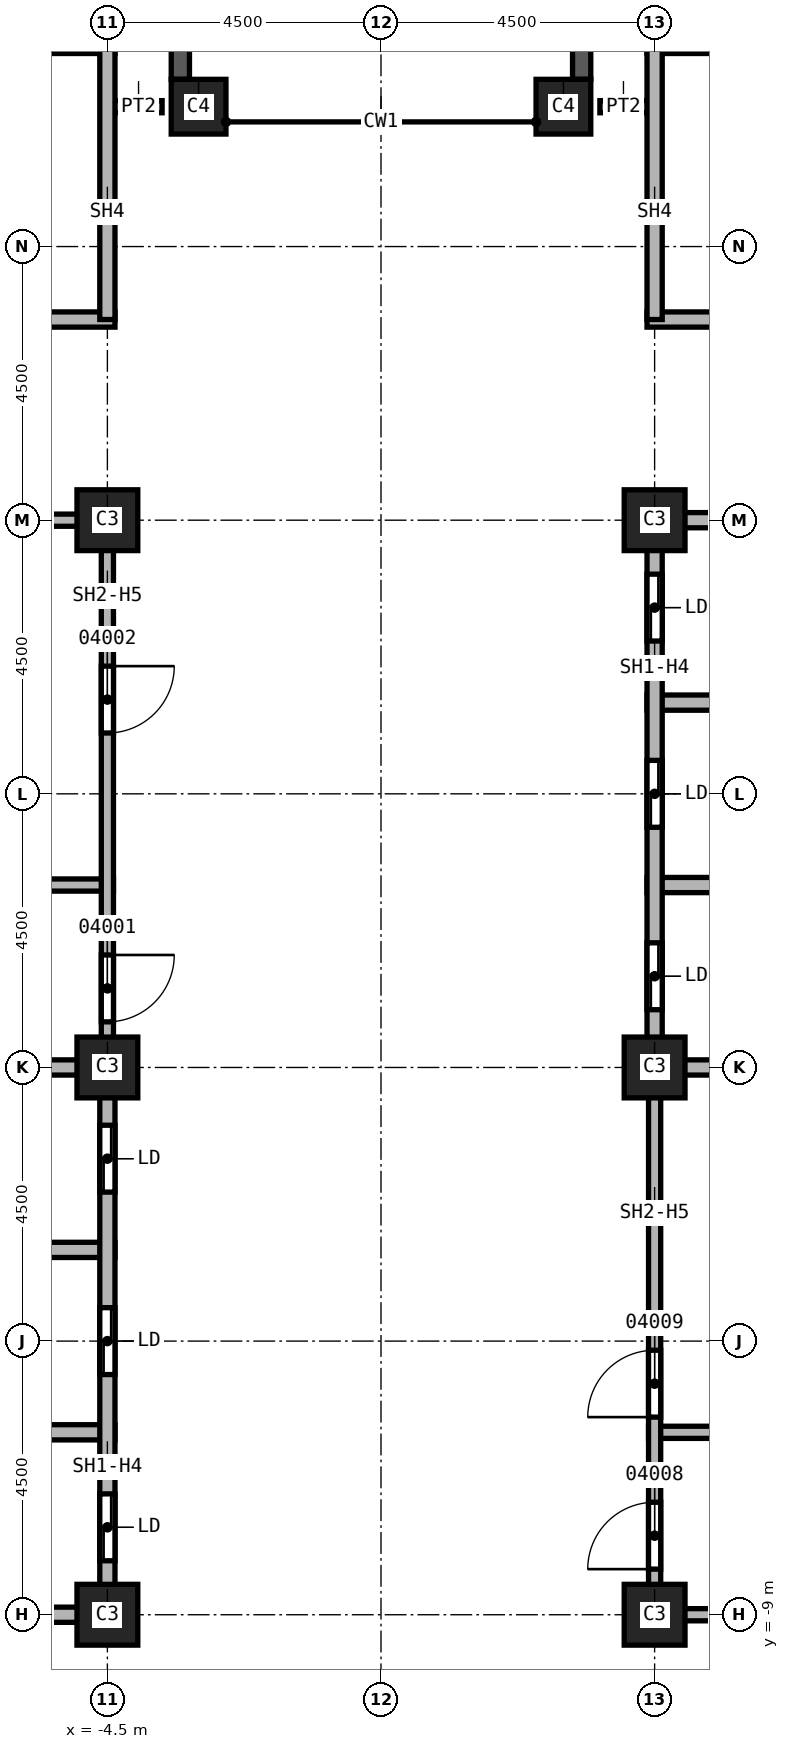
"""IFC4 building model, lengths in metres.
Left out: names, types, materials, properties, quantities, classifications, styles, units other than length and angle.
Written with IfcOpenShell. Run it as: python <this file> out.ifc"""

import sys

from ifc_helpers import new_model, si_unit, direction, frame, frame_2d, origin, origin_2d, place, context, subcontext, project, spatial, rectangle, extrude, element, fill, save


model = new_model("IFC4")
c1 = context("Model", 3, precision=1e-05, world=origin(), true_north=direction((0.0, 1.0)))
c2 = subcontext(c1, "Body", "Model", "MODEL_VIEW")
j1 = project(units=[si_unit("LENGTHUNIT", "METRE"), si_unit("PLANEANGLEUNIT", "RADIAN")], contexts=[c1])
p1 = place(None, origin())
s1 = spatial("IfcSite", under=j1, at=p1, CompositionType="ELEMENT")
p2 = place(p1, origin())
s2 = spatial("IfcBuilding", under=s1, at=p2, CompositionType="ELEMENT")
p3 = place(p2, frame((0.0, 0.0, 108.0)))
s3 = spatial("IfcBuildingStorey", under=s2, at=p3, CompositionType="ELEMENT", Elevation=108.0)
for number, where, z_axis, x_axis in (
    (1, (4.5, 0.0, 0.0), (0.0, 0.0, 1.0), (1.0, 0.0, 0.0)),
    (2, (4.5, 9.0, 0.0), (0.0, 0.0, 1.0), (1.0, 0.0, 0.0)),
    (3, (4.5, -9.0, 0.0), (0.0, 0.0, 1.0), (1.0, 0.0, 0.0)),
    (4, (-4.5, 0.0, 0.0), (0.0, 0.0, 1.0), (1.0, 0.0, 0.0)),
    (5, (-4.5, 9.0, 0.0), (0.0, 0.0, 1.0), (1.0, 0.0, 0.0)),
    (6, (-4.5, -9.0, 0.0), (0.0, 0.0, 1.0), (1.0, 0.0, 0.0)),
):
    element("IfcColumn", number, at=place(p3, frame(where, z_axis=z_axis, x_axis=x_axis)), inside=s3, PredefinedType="COLUMN", context=c2, shape_type="SweptSolid", body=[
        extrude(rectangle(XDim=1.0, YDim=1.0, at=origin_2d()), origin(), (0.0, 0.0, 1.0), 3.7),
    ])
for number, where, z_axis, x_axis in (
    (7, (3.0, 15.8, 0.0), (0.0, 0.0, 1.0), (1.0, 0.0, 0.0)),
    (8, (-3.0, 15.8, 0.0), (0.0, 0.0, 1.0), (1.0, 0.0, 0.0)),
):
    element("IfcColumn", number, at=place(p3, frame(where, z_axis=z_axis, x_axis=x_axis)), inside=s3, PredefinedType="COLUMN", context=c2, shape_type="SweptSolid", body=[
        extrude(rectangle(XDim=0.9, YDim=0.9, at=origin_2d()), origin(), (0.0, 0.0, 1.0), 3.7),
    ])
p4 = place(p3, frame((3.3, 24.2, 0.0), z_axis=(0.0, 0.0, 1.0), x_axis=(0.0, -1.0, 0.0)))
e9 = element("IfcWall", 9, at=p4, inside=s3, PredefinedType="SOLIDWALL", context=c2, shape_type="SweptSolid", body=[
    extrude(rectangle(XDim=7.95, YDim=0.3, at=frame_2d((3.975, 0.0))), origin(), (0.0, 0.0, 1.0), 3.1),
])
p5 = place(p4, frame((0.788, 0.0, 0.8)))
e10 = element("IfcOpeningElement", 10, at=p5, cuts=e9, PredefinedType="OPENING", context=c2, shape_type="SweptSolid", body=[
    extrude(rectangle(XDim=2.4, YDim=1.95, at=frame_2d((1.2, 0.975))), frame((0.0, 0.15, 0.0), z_axis=(0.0, -1.0, 0.0), x_axis=(1.0, 0.0, 0.0)), (0.0, 0.0, 1.0), 0.3),
])
p6 = place(p4, frame((4.762, 0.0, 0.8)))
e11 = element("IfcOpeningElement", 11, at=p6, cuts=e9, PredefinedType="OPENING", context=c2, shape_type="SweptSolid", body=[
    extrude(rectangle(XDim=2.4, YDim=1.95, at=frame_2d((1.2, 0.975))), frame((0.0, 0.15, 0.0), z_axis=(0.0, -1.0, 0.0), x_axis=(1.0, 0.0, 0.0)), (0.0, 0.0, 1.0), 0.3),
])
p7 = place(p3, frame((-3.3, 16.25, 0.0), z_axis=(0.0, 0.0, 1.0), x_axis=(0.0, 1.0, 0.0)))
e12 = element("IfcWall", 12, at=p7, inside=s3, PredefinedType="SOLIDWALL", context=c2, shape_type="SweptSolid", body=[
    extrude(rectangle(XDim=7.95, YDim=0.3, at=frame_2d((3.975, 0.0))), origin(), (0.0, 0.0, 1.0), 3.1),
])
p8 = place(p7, frame((0.788, 0.0, 0.8)))
e13 = element("IfcOpeningElement", 13, at=p8, cuts=e12, PredefinedType="OPENING", context=c2, shape_type="SweptSolid", body=[
    extrude(rectangle(XDim=2.4, YDim=1.95, at=frame_2d((1.2, 0.975))), frame((0.0, 0.15, 0.0), z_axis=(0.0, -1.0, 0.0), x_axis=(1.0, 0.0, 0.0)), (0.0, 0.0, 1.0), 0.3),
])
p9 = place(p7, frame((4.762, 0.0, 0.8)))
e14 = element("IfcOpeningElement", 14, at=p9, cuts=e12, PredefinedType="OPENING", context=c2, shape_type="SweptSolid", body=[
    extrude(rectangle(XDim=2.4, YDim=1.95, at=frame_2d((1.2, 0.975))), frame((0.0, 0.15, 0.0), z_axis=(0.0, -1.0, 0.0), x_axis=(1.0, 0.0, 0.0)), (0.0, 0.0, 1.0), 0.3),
])
for number, where, z_axis, x_axis in (
    (15, (-4.5, 15.8, 0.0), (0.0, 0.0, 1.0), (1.0, 0.0, 0.0)),
    (16, (3.6, 15.8, 0.0), (0.0, 0.0, 1.0), (1.0, 0.0, 0.0)),
):
    element("IfcWall", number, at=place(p3, frame(where, z_axis=z_axis, x_axis=x_axis)), inside=s3, PredefinedType="PARTITIONING", context=c2, shape_type="SweptSolid", body=[
        extrude(rectangle(XDim=0.9, YDim=0.2, at=frame_2d((0.45, 0.0))), origin(), (0.0, 0.0, 1.0), 3.7),
    ])
p10 = place(p3, frame((-7.625, 3.0, 0.0), z_axis=(0.0, 0.0, 1.0), x_axis=(1.0, 0.0, 0.0)))
e17 = element("IfcWall", 17, at=p10, inside=s3, PredefinedType="SOLIDWALL", context=c2, shape_type="SweptSolid", body=[
    extrude(rectangle(XDim=3.225, YDim=0.2, at=frame_2d((1.613, 0.0))), origin(), (0.0, 0.0, 1.0), 3.7),
])
p11 = place(p3, frame((-7.5, 9.0, 0.0), z_axis=(0.0, 0.0, 1.0), x_axis=(1.0, 0.0, 0.0)))
e18 = element("IfcWall", 18, at=p11, inside=s3, PredefinedType="SOLIDWALL", context=c2, shape_type="SweptSolid", body=[
    extrude(rectangle(XDim=3.0, YDim=0.2, at=frame_2d((1.5, 0.0))), origin(), (0.0, 0.0, 1.0), 2.938),
])
p12 = place(p3, frame((-4.5, 9.1, 0.0), z_axis=(0.0, 0.0, 1.0), x_axis=(0.0, -1.0, 0.0)))
e19 = element("IfcWall", 19, at=p12, inside=s3, PredefinedType="SOLIDWALL", context=c2, shape_type="SweptSolid", body=[
    extrude(rectangle(XDim=9.1, YDim=0.2, at=frame_2d((4.55, 0.0))), origin(), (0.0, 0.0, 1.0), 2.938),
])
p13 = place(p12, frame((7.25, 0.0, 0.0)))
e20 = element("IfcOpeningElement", 20, at=p13, cuts=e19, PredefinedType="OPENING", context=c2, shape_type="SweptSolid", body=[
    extrude(rectangle(XDim=1.1, YDim=2.1, at=frame_2d((0.55, 1.05))), frame((0.0, 0.1, 0.0), z_axis=(0.0, -1.0, 0.0), x_axis=(1.0, 0.0, 0.0)), (0.0, 0.0, 1.0), 0.2),
])
p14 = place(p12, frame((2.5, 0.0, 0.0)))
e21 = element("IfcOpeningElement", 21, at=p14, cuts=e19, PredefinedType="OPENING", context=c2, shape_type="SweptSolid", body=[
    extrude(rectangle(XDim=1.1, YDim=2.1, at=frame_2d((0.55, 1.05))), frame((0.0, 0.1, 0.0), z_axis=(0.0, -1.0, 0.0), x_axis=(1.0, 0.0, 0.0)), (0.0, 0.0, 1.0), 0.2),
])
p15 = place(p3, frame((4.4, -6.0, 0.0), z_axis=(0.0, 0.0, 1.0), x_axis=(1.0, 0.0, 0.0)))
e22 = element("IfcWall", 22, at=p15, inside=s3, PredefinedType="SOLIDWALL", context=c2, shape_type="SweptSolid", body=[
    extrude(rectangle(XDim=3.2, YDim=0.2, at=frame_2d((1.6, 0.0))), origin(), (0.0, 0.0, 1.0), 3.7),
])
p16 = place(p3, frame((4.5, -9.1, 0.0), z_axis=(0.0, 0.0, 1.0), x_axis=(0.0, 1.0, 0.0)))
e23 = element("IfcWall", 23, at=p16, inside=s3, PredefinedType="SOLIDWALL", context=c2, shape_type="SweptSolid", body=[
    extrude(rectangle(XDim=9.1, YDim=0.2, at=frame_2d((4.55, 0.0))), origin(), (0.0, 0.0, 1.0), 2.938),
])
p17 = place(p16, frame((0.85, 0.0, 0.0)))
e24 = element("IfcOpeningElement", 24, at=p17, cuts=e23, PredefinedType="OPENING", context=c2, shape_type="SweptSolid", body=[
    extrude(rectangle(XDim=1.1, YDim=2.1, at=frame_2d((0.55, 1.05))), frame((0.0, 0.1, 0.0), z_axis=(0.0, -1.0, 0.0), x_axis=(1.0, 0.0, 0.0)), (0.0, 0.0, 1.0), 0.2),
])
p18 = place(p16, frame((3.35, 0.0, 0.0)))
e25 = element("IfcOpeningElement", 25, at=p18, cuts=e23, PredefinedType="OPENING", context=c2, shape_type="SweptSolid", body=[
    extrude(rectangle(XDim=1.1, YDim=2.1, at=frame_2d((0.55, 1.05))), frame((0.0, 0.1, 0.0), z_axis=(0.0, -1.0, 0.0), x_axis=(1.0, 0.0, 0.0)), (0.0, 0.0, 1.0), 0.2),
])
p19 = place(p3, frame((7.5, -9.0, 0.0), z_axis=(0.0, 0.0, 1.0), x_axis=(-1.0, 0.0, 0.0)))
e26 = element("IfcWall", 26, at=p19, inside=s3, PredefinedType="SOLIDWALL", context=c2, shape_type="SweptSolid", body=[
    extrude(rectangle(XDim=3.0, YDim=0.2, at=frame_2d((1.5, 0.0))), origin(), (0.0, 0.0, 1.0), 2.938),
])
p20 = place(p3, frame((-13.625, -3.0, 0.0), z_axis=(0.0, 0.0, 1.0), x_axis=(1.0, 0.0, 0.0)))
e27 = element("IfcWall", 27, at=p20, inside=s3, PredefinedType="SOLIDWALL", context=c2, shape_type="SweptSolid", body=[
    extrude(rectangle(XDim=9.25, YDim=0.25, at=frame_2d((4.625, 0.0))), origin(), (0.0, 0.0, 1.0), 3.7),
])
p21 = place(p20, frame((3.25, 0.0, 0.0)))
e28 = element("IfcOpeningElement", 28, at=p21, cuts=e27, PredefinedType="OPENING", context=c2, shape_type="SweptSolid", body=[
    extrude(rectangle(XDim=1.1, YDim=2.1, at=frame_2d((0.55, 1.05))), frame((0.0, 0.125, 0.0), z_axis=(0.0, -1.0, 0.0), x_axis=(1.0, 0.0, 0.0)), (0.0, 0.0, 1.0), 0.25),
])
for number, where, z_axis, x_axis in (
    (29, (-7.625, -6.0, 0.0), (0.0, 0.0, 1.0), (1.0, 0.0, 0.0)),
    (30, (-7.625, 0.0, 0.0), (0.0, 0.0, 1.0), (1.0, 0.0, 0.0)),
):
    element("IfcWall", number, at=place(p3, frame(where, z_axis=z_axis, x_axis=x_axis)), inside=s3, PredefinedType="SOLIDWALL", context=c2, shape_type="SweptSolid", body=[
        extrude(rectangle(XDim=3.25, YDim=0.25, at=frame_2d((1.625, 0.0))), origin(), (0.0, 0.0, 1.0), 3.7),
    ])
p22 = place(p3, frame((-4.5, -9.0, 0.0), z_axis=(0.0, 0.0, 1.0), x_axis=(-1.0, 0.0, 0.0)))
e31 = element("IfcWall", 31, at=p22, inside=s3, PredefinedType="SOLIDWALL", context=c2, shape_type="SweptSolid", body=[
    extrude(rectangle(XDim=3.0, YDim=0.25, at=frame_2d((1.5, 0.0))), origin(), (0.0, 0.0, 1.0), 2.938),
])
p23 = place(p3, frame((-4.5, 0.0, 0.0), z_axis=(0.0, 0.0, 1.0), x_axis=(0.0, -1.0, 0.0)))
e32 = element("IfcWall", 32, at=p23, inside=s3, PredefinedType="SOLIDWALL", context=c2, shape_type="SweptSolid", body=[
    extrude(rectangle(XDim=9.125, YDim=0.25, at=frame_2d((4.562, 0.0))), origin(), (0.0, 0.0, 1.0), 2.938),
])
p24 = place(p23, frame((7.012, 0.0, 0.0)))
e33 = element("IfcOpeningElement", 33, at=p24, cuts=e32, PredefinedType="OPENING", context=c2, shape_type="SweptSolid", body=[
    extrude(rectangle(XDim=1.1, YDim=2.1, at=frame_2d((0.55, 1.05))), frame((0.0, 0.125, 0.0), z_axis=(0.0, -1.0, 0.0), x_axis=(1.0, 0.0, 0.0)), (0.0, 0.0, 1.0), 0.25),
])
p25 = place(p23, frame((3.95, 0.0, 0.0)))
e34 = element("IfcOpeningElement", 34, at=p25, cuts=e32, PredefinedType="OPENING", context=c2, shape_type="SweptSolid", body=[
    extrude(rectangle(XDim=1.1, YDim=2.1, at=frame_2d((0.55, 1.05))), frame((0.0, 0.125, 0.0), z_axis=(0.0, -1.0, 0.0), x_axis=(1.0, 0.0, 0.0)), (0.0, 0.0, 1.0), 0.25),
])
p26 = place(p23, frame((0.95, 0.0, 0.0)))
e35 = element("IfcOpeningElement", 35, at=p26, cuts=e32, PredefinedType="OPENING", context=c2, shape_type="SweptSolid", body=[
    extrude(rectangle(XDim=1.1, YDim=2.1, at=frame_2d((0.55, 1.05))), frame((0.0, 0.125, 0.0), z_axis=(0.0, -1.0, 0.0), x_axis=(1.0, 0.0, 0.0)), (0.0, 0.0, 1.0), 0.25),
])
p27 = place(p3, frame((4.375, 0.0, 0.0), z_axis=(0.0, 0.0, 1.0), x_axis=(1.0, 0.0, 0.0)))
e36 = element("IfcWall", 36, at=p27, inside=s3, PredefinedType="SOLIDWALL", context=c2, shape_type="SweptSolid", body=[
    extrude(rectangle(XDim=3.25, YDim=0.25, at=frame_2d((1.625, 0.0))), origin(), (0.0, 0.0, 1.0), 3.7),
])
p28 = place(p3, frame((4.375, 3.0, 0.0), z_axis=(0.0, 0.0, 1.0), x_axis=(1.0, 0.0, 0.0)))
e37 = element("IfcWall", 37, at=p28, inside=s3, PredefinedType="SOLIDWALL", context=c2, shape_type="SweptSolid", body=[
    extrude(rectangle(XDim=9.25, YDim=0.25, at=frame_2d((4.625, 0.0))), origin(), (0.0, 0.0, 1.0), 3.7),
])
p29 = place(p28, frame((3.375, 0.0, 0.0)))
e38 = element("IfcOpeningElement", 38, at=p29, cuts=e37, PredefinedType="OPENING", context=c2, shape_type="SweptSolid", body=[
    extrude(rectangle(XDim=1.1, YDim=2.1, at=frame_2d((0.55, 1.05))), frame((0.0, 0.125, 0.0), z_axis=(0.0, -1.0, 0.0), x_axis=(1.0, 0.0, 0.0)), (0.0, 0.0, 1.0), 0.25),
])
p30 = place(p3, frame((4.375, 6.0, 0.0), z_axis=(0.0, 0.0, 1.0), x_axis=(1.0, 0.0, 0.0)))
e39 = element("IfcWall", 39, at=p30, inside=s3, PredefinedType="SOLIDWALL", context=c2, shape_type="SweptSolid", body=[
    extrude(rectangle(XDim=3.25, YDim=0.25, at=frame_2d((1.625, 0.0))), origin(), (0.0, 0.0, 1.0), 3.7),
])
p31 = place(p3, frame((4.5, 0.0, 0.0), z_axis=(0.0, 0.0, 1.0), x_axis=(0.0, 1.0, 0.0)))
e40 = element("IfcWall", 40, at=p31, inside=s3, PredefinedType="SOLIDWALL", context=c2, shape_type="SweptSolid", body=[
    extrude(rectangle(XDim=9.125, YDim=0.25, at=frame_2d((4.562, 0.0))), origin(), (0.0, 0.0, 1.0), 2.938),
])
p32 = place(p31, frame((0.95, 0.0, 0.0)))
e41 = element("IfcOpeningElement", 41, at=p32, cuts=e40, PredefinedType="OPENING", context=c2, shape_type="SweptSolid", body=[
    extrude(rectangle(XDim=1.1, YDim=2.1, at=frame_2d((0.55, 1.05))), frame((0.0, 0.125, 0.0), z_axis=(0.0, -1.0, 0.0), x_axis=(1.0, 0.0, 0.0)), (0.0, 0.0, 1.0), 0.25),
])
p33 = place(p31, frame((3.95, 0.0, 0.0)))
e42 = element("IfcOpeningElement", 42, at=p33, cuts=e40, PredefinedType="OPENING", context=c2, shape_type="SweptSolid", body=[
    extrude(rectangle(XDim=1.1, YDim=2.1, at=frame_2d((0.55, 1.05))), frame((0.0, 0.125, 0.0), z_axis=(0.0, -1.0, 0.0), x_axis=(1.0, 0.0, 0.0)), (0.0, 0.0, 1.0), 0.25),
])
p34 = place(p31, frame((7.012, 0.0, 0.0)))
e43 = element("IfcOpeningElement", 43, at=p34, cuts=e40, PredefinedType="OPENING", context=c2, shape_type="SweptSolid", body=[
    extrude(rectangle(XDim=1.1, YDim=2.1, at=frame_2d((0.55, 1.05))), frame((0.0, 0.125, 0.0), z_axis=(0.0, -1.0, 0.0), x_axis=(1.0, 0.0, 0.0)), (0.0, 0.0, 1.0), 0.25),
])
p35 = place(p3, frame((4.5, 9.0, 0.0), z_axis=(0.0, 0.0, 1.0), x_axis=(1.0, 0.0, 0.0)))
e44 = element("IfcWall", 44, at=p35, inside=s3, PredefinedType="SOLIDWALL", context=c2, shape_type="SweptSolid", body=[
    extrude(rectangle(XDim=3.0, YDim=0.25, at=frame_2d((1.5, 0.0))), origin(), (0.0, 0.0, 1.0), 2.938),
])
p36 = place(p3, frame((-13.5, 12.3, 0.0), z_axis=(0.0, 0.0, 1.0), x_axis=(1.0, 0.0, 0.0)))
e45 = element("IfcWall", 45, at=p36, inside=s3, PredefinedType="SOLIDWALL", context=c2, shape_type="SweptSolid", body=[
    extrude(rectangle(XDim=9.125, YDim=0.25, at=frame_2d((4.562, 0.0))), origin(), (0.0, 0.0, 1.0), 3.7),
])
p37 = place(p36, frame((0.6, 0.0, 0.0)))
e46 = element("IfcOpeningElement", 46, at=p37, cuts=e45, PredefinedType="OPENING", context=c2, shape_type="SweptSolid", body=[
    extrude(rectangle(XDim=1.2, YDim=2.1, at=frame_2d((0.6, 1.05))), frame((0.0, 0.125, 0.0), z_axis=(0.0, -1.0, 0.0), x_axis=(1.0, 0.0, 0.0)), (0.0, 0.0, 1.0), 0.25),
])
p38 = place(p3, frame((-13.5, 16.8, 0.0), z_axis=(0.0, 0.0, 1.0), x_axis=(1.0, 0.0, 0.0)))
e47 = element("IfcWall", 47, at=p38, inside=s3, PredefinedType="SOLIDWALL", context=c2, shape_type="SweptSolid", body=[
    extrude(rectangle(XDim=9.125, YDim=0.25, at=frame_2d((4.562, 0.0))), origin(), (0.0, 0.0, 1.0), 3.7),
])
p39 = place(p3, frame((-4.5, 16.8, 0.0), z_axis=(0.0, 0.0, 1.0), x_axis=(0.0, -1.0, 0.0)))
e48 = element("IfcWall", 48, at=p39, inside=s3, PredefinedType="SOLIDWALL", context=c2, shape_type="SweptSolid", body=[
    extrude(rectangle(XDim=4.5, YDim=0.25, at=frame_2d((2.25, 0.0))), origin(), (0.0, 0.0, 1.0), 3.7),
])
p40 = place(p3, frame((4.375, 12.3, 0.0), z_axis=(0.0, 0.0, 1.0), x_axis=(1.0, 0.0, 0.0)))
e49 = element("IfcWall", 49, at=p40, inside=s3, PredefinedType="SOLIDWALL", context=c2, shape_type="SweptSolid", body=[
    extrude(rectangle(XDim=9.125, YDim=0.25, at=frame_2d((4.562, 0.0))), origin(), (0.0, 0.0, 1.0), 3.7),
])
p41 = place(p40, frame((7.2, 0.0, 0.0)))
e50 = element("IfcOpeningElement", 50, at=p41, cuts=e49, PredefinedType="OPENING", context=c2, shape_type="SweptSolid", body=[
    extrude(rectangle(XDim=1.2, YDim=2.1, at=frame_2d((0.6, 1.05))), frame((0.0, 0.125, 0.0), z_axis=(0.0, -1.0, 0.0), x_axis=(1.0, 0.0, 0.0)), (0.0, 0.0, 1.0), 0.25),
])
p42 = place(p3, frame((4.375, 16.8, 0.0), z_axis=(0.0, 0.0, 1.0), x_axis=(1.0, 0.0, 0.0)))
e51 = element("IfcWall", 51, at=p42, inside=s3, PredefinedType="SOLIDWALL", context=c2, shape_type="SweptSolid", body=[
    extrude(rectangle(XDim=9.125, YDim=0.25, at=frame_2d((4.562, 0.0))), origin(), (0.0, 0.0, 1.0), 3.7),
])
p43 = place(p3, frame((4.5, 12.3, 0.0), z_axis=(0.0, 0.0, 1.0), x_axis=(0.0, 1.0, 0.0)))
e52 = element("IfcWall", 52, at=p43, inside=s3, PredefinedType="SOLIDWALL", context=c2, shape_type="SweptSolid", body=[
    extrude(rectangle(XDim=4.5, YDim=0.25, at=frame_2d((2.25, 0.0))), origin(), (0.0, 0.0, 1.0), 3.7),
])
p44 = place(p13, origin())
e53 = element("IfcDoor", 53, at=p44, inside=s3, OperationType="SINGLE_SWING_RIGHT", PredefinedType="DOOR", context=c2, shape_type="SweptSolid", body=[
    extrude(rectangle(XDim=1.1, YDim=2.1, at=frame_2d((0.55, 1.05))), frame((0.0, 0.025, 0.0), z_axis=(0.0, -1.0, 0.0), x_axis=(1.0, 0.0, 0.0)), (0.0, 0.0, 1.0), 0.05),
])
fill(e20, e53)
p45 = place(p14, origin())
e54 = element("IfcDoor", 54, at=p45, inside=s3, OperationType="SINGLE_SWING_LEFT", PredefinedType="DOOR", context=c2, shape_type="SweptSolid", body=[
    extrude(rectangle(XDim=1.1, YDim=2.1, at=frame_2d((0.55, 1.05))), frame((0.0, 0.025, 0.0), z_axis=(0.0, -1.0, 0.0), x_axis=(1.0, 0.0, 0.0)), (0.0, 0.0, 1.0), 0.05),
])
fill(e21, e54)
p46 = place(p17, origin())
e55 = element("IfcDoor", 55, at=p46, inside=s3, OperationType="SINGLE_SWING_LEFT", PredefinedType="DOOR", context=c2, shape_type="SweptSolid", body=[
    extrude(rectangle(XDim=1.1, YDim=2.1, at=frame_2d((0.55, 1.05))), frame((0.0, 0.025, 0.0), z_axis=(0.0, -1.0, 0.0), x_axis=(1.0, 0.0, 0.0)), (0.0, 0.0, 1.0), 0.05),
])
fill(e24, e55)
p47 = place(p18, origin())
e56 = element("IfcDoor", 56, at=p47, inside=s3, OperationType="SINGLE_SWING_RIGHT", PredefinedType="DOOR", context=c2, shape_type="SweptSolid", body=[
    extrude(rectangle(XDim=1.1, YDim=2.1, at=frame_2d((0.55, 1.05))), frame((0.0, 0.025, 0.0), z_axis=(0.0, -1.0, 0.0), x_axis=(1.0, 0.0, 0.0)), (0.0, 0.0, 1.0), 0.05),
])
fill(e25, e56)
p48 = place(p24, origin())
e57 = element("IfcDoor", 57, at=p48, inside=s3, OperationType="SLIDING_TO_LEFT", PredefinedType="DOOR", context=c2, shape_type="SweptSolid", body=[
    extrude(rectangle(XDim=1.1, YDim=2.1, at=frame_2d((0.55, 1.05))), frame((0.0, 0.025, 0.0), z_axis=(0.0, -1.0, 0.0), x_axis=(1.0, 0.0, 0.0)), (0.0, 0.0, 1.0), 0.05),
])
fill(e33, e57)
p49 = place(p25, origin())
e58 = element("IfcDoor", 58, at=p49, inside=s3, OperationType="SLIDING_TO_LEFT", PredefinedType="DOOR", context=c2, shape_type="SweptSolid", body=[
    extrude(rectangle(XDim=1.1, YDim=2.1, at=frame_2d((0.55, 1.05))), frame((0.0, 0.025, 0.0), z_axis=(0.0, -1.0, 0.0), x_axis=(1.0, 0.0, 0.0)), (0.0, 0.0, 1.0), 0.05),
])
fill(e34, e58)
p50 = place(p26, origin())
e59 = element("IfcDoor", 59, at=p50, inside=s3, OperationType="SLIDING_TO_LEFT", PredefinedType="DOOR", context=c2, shape_type="SweptSolid", body=[
    extrude(rectangle(XDim=1.1, YDim=2.1, at=frame_2d((0.55, 1.05))), frame((0.0, 0.025, 0.0), z_axis=(0.0, -1.0, 0.0), x_axis=(1.0, 0.0, 0.0)), (0.0, 0.0, 1.0), 0.05),
])
fill(e35, e59)
p51 = place(p32, origin())
e60 = element("IfcDoor", 60, at=p51, inside=s3, OperationType="SLIDING_TO_LEFT", PredefinedType="DOOR", context=c2, shape_type="SweptSolid", body=[
    extrude(rectangle(XDim=1.1, YDim=2.1, at=frame_2d((0.55, 1.05))), frame((0.0, 0.025, 0.0), z_axis=(0.0, -1.0, 0.0), x_axis=(1.0, 0.0, 0.0)), (0.0, 0.0, 1.0), 0.05),
])
fill(e41, e60)
p52 = place(p33, origin())
e61 = element("IfcDoor", 61, at=p52, inside=s3, OperationType="SLIDING_TO_LEFT", PredefinedType="DOOR", context=c2, shape_type="SweptSolid", body=[
    extrude(rectangle(XDim=1.1, YDim=2.1, at=frame_2d((0.55, 1.05))), frame((0.0, 0.025, 0.0), z_axis=(0.0, -1.0, 0.0), x_axis=(1.0, 0.0, 0.0)), (0.0, 0.0, 1.0), 0.05),
])
fill(e42, e61)
p53 = place(p34, origin())
e62 = element("IfcDoor", 62, at=p53, inside=s3, OperationType="SLIDING_TO_LEFT", PredefinedType="DOOR", context=c2, shape_type="SweptSolid", body=[
    extrude(rectangle(XDim=1.1, YDim=2.1, at=frame_2d((0.55, 1.05))), frame((0.0, 0.025, 0.0), z_axis=(0.0, -1.0, 0.0), x_axis=(1.0, 0.0, 0.0)), (0.0, 0.0, 1.0), 0.05),
])
fill(e43, e62)
save(model, sys.argv[1])
